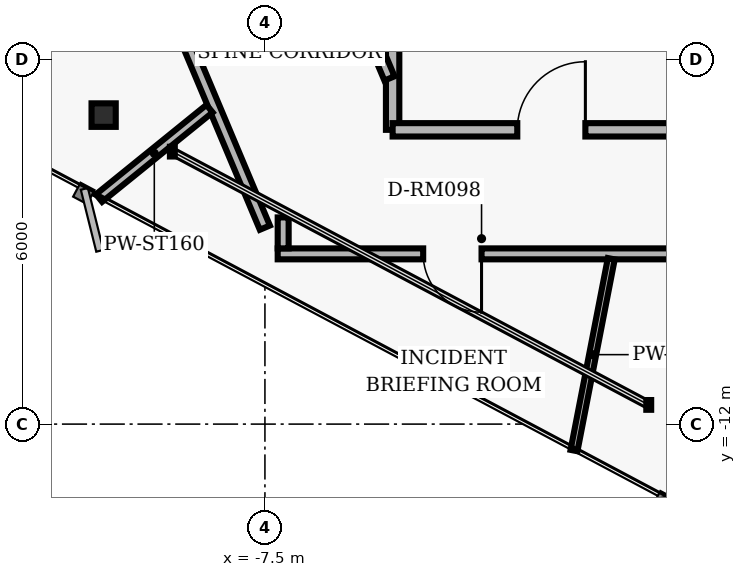
"""IFC4 building model, lengths in metres.
Left out: names, types, materials, properties, quantities, classifications, styles, units other than length and angle.
Written with IfcOpenShell. Run it as: python <this file> out.ifc"""

import sys

from ifc_helpers import new_model, si_unit, direction, frame, frame_2d, origin, origin_2d, place, context, subcontext, project, spatial, rectangle, i_section, extrude, element, fill, save


model = new_model("IFC4")
c1 = context("Model", 3, precision=1e-05, world=origin(), true_north=direction((0.0, 1.0)))
c2 = subcontext(c1, "Body", "Model", "MODEL_VIEW")
j1 = project(units=[si_unit("LENGTHUNIT", "METRE"), si_unit("PLANEANGLEUNIT", "RADIAN")], contexts=[c1])
p1 = place(None, origin())
s1 = spatial("IfcSite", under=j1, at=p1, CompositionType="ELEMENT")
p2 = place(p1, origin())
s2 = spatial("IfcBuilding", under=s1, at=p2, CompositionType="ELEMENT")
p3 = place(p2, frame((0.0, 0.0, 199.68)))
s3 = spatial("IfcBuildingStorey", under=s2, at=p3, CompositionType="ELEMENT", Elevation=199.68)
p4 = place(p3, frame((-10.153, -6.918, 0.0), z_axis=(0.0, 0.0, 1.0), x_axis=(1.0, 0.0, 0.0)))
e1 = element("IfcColumn", 1, at=p4, inside=s3, PredefinedType="COLUMN", context=c2, shape_type="SweptSolid", body=[
    extrude(i_section(OverallWidth=0.398, OverallDepth=0.387, WebThickness=0.021, FlangeThickness=0.033, FilletRadius=0.018, at=origin_2d()), origin(), (0.0, 0.0, 1.0), 3.04),
])
p5 = place(p3, frame((-5.4, -7.16, 0.0), z_axis=(0.0, 0.0, 1.0), x_axis=(0.0, 1.0, 0.0)))
e2 = element("IfcWall", 2, at=p5, inside=s3, PredefinedType="PARTITIONING", context=c2, shape_type="SweptSolid", body=[
    extrude(rectangle(XDim=2.71, YDim=0.22, at=frame_2d((1.355, 0.0))), origin(), (0.0, 0.0, 1.0), 2.773),
])
p6 = place(p3, frame((-5.4, -7.16, 0.0), z_axis=(0.0, 0.0, 1.0), x_axis=(1.0, 0.0, 0.0)))
e3 = element("IfcWall", 3, at=p6, inside=s3, PredefinedType="PARTITIONING", context=c2, shape_type="SweptSolid", body=[
    extrude(rectangle(XDim=5.4, YDim=0.22, at=frame_2d((2.7, 0.0))), origin(), (0.0, 0.0, 1.0), 2.395),
])
p7 = place(p6, frame((2.05, 0.0, 0.0)))
e4 = element("IfcOpeningElement", 4, at=p7, cuts=e3, PredefinedType="OPENING", context=c2, shape_type="SweptSolid", body=[
    extrude(rectangle(XDim=1.12, YDim=2.02, at=frame_2d((0.56, 1.01))), frame((0.0, 0.12, 0.0), z_axis=(0.0, -1.0, 0.0), x_axis=(1.0, 0.0, 0.0)), (0.0, 0.0, 1.0), 0.24),
])
p8 = place(p3, frame((-7.501, -8.769, 0.0), z_axis=(0.0, 0.0, 1.0), x_axis=(-0.387573945081, 0.921838617706, 0.0)))
e5 = element("IfcWall", 5, at=p8, inside=s3, PredefinedType="PARTITIONING", context=c2, shape_type="SweptSolid", body=[
    extrude(rectangle(XDim=4.813, YDim=0.18, at=frame_2d((2.407, 0.0))), origin(), (0.0, 0.0, 1.0), 2.773),
])
p9 = place(p3, frame((-6.055, -4.882, 0.0), z_axis=(0.0, 0.0, 1.0), x_axis=(0.387579540458, -0.921836265189, 0.0)))
e6 = element("IfcWall", 6, at=p9, inside=s3, PredefinedType="PARTITIONING", context=c2, shape_type="SweptSolid", body=[
    extrude(rectangle(XDim=1.555, YDim=0.18, at=frame_2d((0.777, 0.0))), origin(), (0.0, 0.0, 1.0), 2.253),
])
p10 = place(p3, frame((6.01, -9.2, 0.0), z_axis=(0.0, 0.0, 1.0), x_axis=(-1.0, 0.0, 0.0)))
e7 = element("IfcWall", 7, at=p10, inside=s3, PredefinedType="PARTITIONING", context=c2, shape_type="SweptSolid", body=[
    extrude(rectangle(XDim=13.3, YDim=0.18, at=frame_2d((6.65, 0.0))), origin(), (0.0, 0.0, 1.0), 2.395),
])
p11 = place(p10, frame((9.948, 0.0, 0.0)))
e8 = element("IfcOpeningElement", 8, at=p11, cuts=e7, PredefinedType="OPENING", context=c2, shape_type="SweptSolid", body=[
    extrude(rectangle(XDim=0.96, YDim=2.02, at=frame_2d((0.48, 1.01))), frame((0.0, 0.1, 0.0), z_axis=(0.0, -1.0, 0.0), x_axis=(1.0, 0.0, 0.0)), (0.0, 0.0, 1.0), 0.2),
])
p12 = place(p10, frame((3.857, 0.0, 0.0)))
e9 = element("IfcOpeningElement", 9, at=p12, cuts=e7, PredefinedType="OPENING", context=c2, shape_type="SweptSolid", body=[
    extrude(rectangle(XDim=0.96, YDim=2.02, at=frame_2d((0.48, 1.01))), frame((0.0, 0.1, 0.0), z_axis=(0.0, -1.0, 0.0), x_axis=(1.0, 0.0, 0.0)), (0.0, 0.0, 1.0), 0.2),
])
p13 = place(p3, frame((-7.2, -9.11, 0.0), z_axis=(0.0, 0.0, 1.0), x_axis=(0.0, 1.0, 0.0)))
e10 = element("IfcWall", 10, at=p13, inside=s3, PredefinedType="PARTITIONING", context=c2, shape_type="SweptSolid", body=[
    extrude(rectangle(XDim=0.51, YDim=0.18, at=frame_2d((0.255, 0.0))), origin(), (0.0, 0.0, 1.0), 2.773),
])
p14 = place(p3, frame((-8.411, -6.811, 0.0), z_axis=(0.0, 0.0, 1.0), x_axis=(-0.777176762159, -0.629282353448, 0.0)))
e11 = element("IfcWall", 11, at=p14, inside=s3, PredefinedType="PARTITIONING", context=c2, shape_type="SweptSolid", body=[
    extrude(rectangle(XDim=2.337, YDim=0.16, at=frame_2d((1.169, 0.0))), origin(), (0.0, 0.0, 1.0), 2.773),
])
p15 = place(p3, frame((-1.804, -9.28, 0.0), z_axis=(0.0, 0.0, 1.0), x_axis=(-0.190810698239, -0.981626852443, 0.0)))
e12 = element("IfcWall", 12, at=p15, inside=s3, PredefinedType="MOVABLE", context=c2, shape_type="SweptSolid", body=[
    extrude(rectangle(XDim=3.214, YDim=0.115, at=frame_2d((1.607, 0.0))), origin(), (0.0, 0.0, 1.0), 2.773),
])
p16 = place(p7, origin())
e13 = element("IfcDoor", 13, at=p16, inside=s3, OperationType="SINGLE_SWING_RIGHT", PredefinedType="DOOR", context=c2, shape_type="SweptSolid", body=[
    extrude(rectangle(XDim=1.12, YDim=2.02, at=frame_2d((0.56, 1.01))), frame((0.0, 0.025, 0.0), z_axis=(0.0, -1.0, 0.0), x_axis=(1.0, 0.0, 0.0)), (0.0, 0.0, 1.0), 0.05),
])
fill(e4, e13)
p17 = place(p11, origin())
e14 = element("IfcDoor", 14, at=p17, inside=s3, OperationType="SINGLE_SWING_LEFT", PredefinedType="DOOR", context=c2, shape_type="SweptSolid", body=[
    extrude(rectangle(XDim=0.96, YDim=2.02, at=frame_2d((0.48, 1.01))), frame((0.0, 0.025, 0.0), z_axis=(0.0, -1.0, 0.0), x_axis=(1.0, 0.0, 0.0)), (0.0, 0.0, 1.0), 0.05),
])
fill(e8, e14)
save(model, sys.argv[1])
